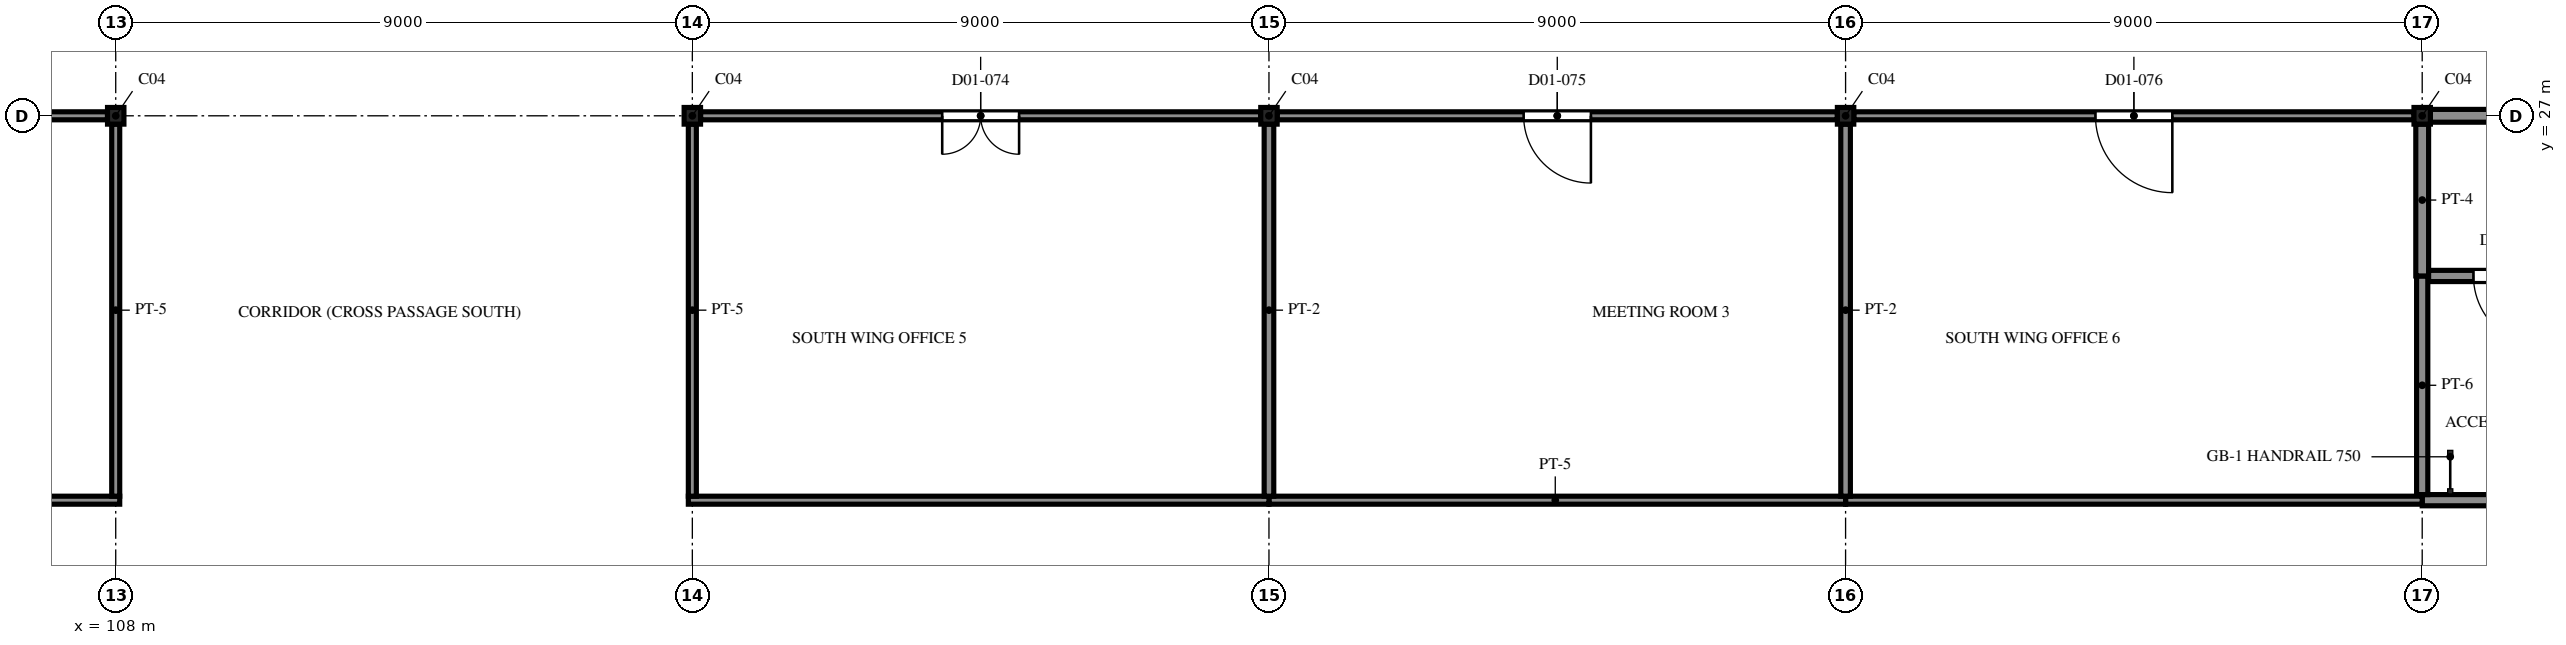
"""IFC4 building model, lengths in metres.
Left out: names, types, materials, properties, quantities, classifications, styles, units other than length and angle.
Written with IfcOpenShell. Run it as: python <this file> out.ifc"""

import sys

from ifc_helpers import new_model, si_unit, direction, frame, frame_2d, origin, origin_2d, place, context, subcontext, project, spatial, polyline, rectangle, i_section, outline, extrude, element, fill, save


model = new_model("IFC4")
c1 = context("Model", 3, precision=1e-05, world=origin(), true_north=direction((0.0, 1.0)))
c2 = subcontext(c1, "Body", "Model", "MODEL_VIEW")
j1 = project(units=[si_unit("LENGTHUNIT", "METRE"), si_unit("PLANEANGLEUNIT", "RADIAN")], contexts=[c1])
p1 = place(None, origin())
s1 = spatial("IfcSite", under=j1, at=p1, CompositionType="ELEMENT")
p2 = place(p1, origin())
s2 = spatial("IfcBuilding", under=s1, at=p2, CompositionType="ELEMENT")
p3 = place(p2, frame((0.0, 0.0, 7.5)))
s3 = spatial("IfcBuildingStorey", under=s2, at=p3, CompositionType="ELEMENT", Elevation=7.5)
for number, where, z_axis, x_axis in (
    (1, (108.0, 27.0, 0.0), (0.0, 0.0, 1.0), (1.0, 0.0, 0.0)),
    (2, (117.0, 27.0, 0.0), (0.0, 0.0, 1.0), (1.0, 0.0, 0.0)),
    (3, (126.0, 27.0, 0.0), (0.0, 0.0, 1.0), (1.0, 0.0, 0.0)),
    (4, (135.0, 27.0, 0.0), (0.0, 0.0, 1.0), (1.0, 0.0, 0.0)),
    (5, (144.0, 27.0, 0.0), (0.0, 0.0, 1.0), (1.0, 0.0, 0.0)),
):
    element("IfcColumn", number, at=place(p3, frame(where, z_axis=z_axis, x_axis=x_axis)), inside=s3, PredefinedType="COLUMN", context=c2, shape_type="SweptSolid", body=[
        extrude(i_section(OverallWidth=0.256, OverallDepth=0.26, WebThickness=0.01, FlangeThickness=0.017, FilletRadius=0.013, at=origin_2d()), origin(), (0.0, 0.0, 1.0), 4.2),
    ])
p4 = place(p3, frame((144.0, 21.0, 0.0), z_axis=(0.0, 0.0, 1.0), x_axis=(1.0, 0.0, 0.0)))
e6 = element("IfcWall", 6, at=p4, inside=s3, PredefinedType="PARTITIONING", context=c2, shape_type="SweptSolid", body=[
    extrude(rectangle(XDim=2.7, YDim=0.175, at=frame_2d((1.35, 0.0))), origin(), (0.0, 0.0, 1.0), 3.307),
])
for number, where, z_axis, x_axis in (
    (7, (135.0, 21.0, 0.0), (0.0, 0.0, 1.0), (1.0, 0.0, 0.0)),
    (8, (126.0, 21.0, 0.0), (0.0, 0.0, 1.0), (1.0, 0.0, 0.0)),
):
    element("IfcWall", number, at=place(p3, frame(where, z_axis=z_axis, x_axis=x_axis)), inside=s3, PredefinedType="PARTITIONING", context=c2, shape_type="SweptSolid", body=[
        extrude(rectangle(XDim=9.0, YDim=0.125, at=frame_2d((4.5, 0.0))), origin(), (0.0, 0.0, 1.0), 3.307),
    ])
for number, where, z_axis, x_axis in (
    (9, (99.0, 21.0, 0.0), (0.0, 0.0, 1.0), (1.0, 0.0, 0.0)),
    (10, (116.938, 21.0, 0.0), (0.0, 0.0, 1.0), (1.0, 0.0, 0.0)),
):
    element("IfcWall", number, at=place(p3, frame(where, z_axis=z_axis, x_axis=x_axis)), inside=s3, PredefinedType="PARTITIONING", context=c2, shape_type="SweptSolid", body=[
        extrude(rectangle(XDim=9.062, YDim=0.125, at=frame_2d((4.531, 0.0))), origin(), (0.0, 0.0, 1.0), 3.307),
    ])
p5 = place(p3, frame((143.872, 27.0, 0.0), z_axis=(0.0, 0.0, 1.0), x_axis=(-1.0, 0.0, 0.0)))
e11 = element("IfcWall", 11, at=p5, inside=s3, PredefinedType="PARTITIONING", context=c2, shape_type="SweptSolid", body=[
    extrude(rectangle(XDim=8.744, YDim=0.125, at=frame_2d((4.372, 0.0))), origin(), (0.0, 0.0, 1.0), 3.307),
])
p6 = place(p5, frame((3.772, 0.0, 0.0)))
e12 = element("IfcOpeningElement", 12, at=p6, cuts=e11, PredefinedType="OPENING", context=c2, shape_type="SweptSolid", body=[
    extrude(rectangle(XDim=1.2, YDim=2.1, at=frame_2d((0.6, 1.05))), frame((0.0, 0.073, 0.0), z_axis=(0.0, -1.0, 0.0), x_axis=(1.0, 0.0, 0.0)), (0.0, 0.0, 1.0), 0.145),
])
p7 = place(p3, frame((134.872, 27.0, 0.0), z_axis=(0.0, 0.0, 1.0), x_axis=(-1.0, 0.0, 0.0)))
e13 = element("IfcWall", 13, at=p7, inside=s3, PredefinedType="PARTITIONING", context=c2, shape_type="SweptSolid", body=[
    extrude(rectangle(XDim=8.744, YDim=0.125, at=frame_2d((4.372, 0.0))), origin(), (0.0, 0.0, 1.0), 3.307),
])
p8 = place(p7, frame((3.847, 0.0, 0.0)))
e14 = element("IfcOpeningElement", 14, at=p8, cuts=e13, PredefinedType="OPENING", context=c2, shape_type="SweptSolid", body=[
    extrude(rectangle(XDim=1.05, YDim=2.1, at=frame_2d((0.525, 1.05))), frame((0.0, 0.073, 0.0), z_axis=(0.0, -1.0, 0.0), x_axis=(1.0, 0.0, 0.0)), (0.0, 0.0, 1.0), 0.145),
])
p9 = place(p3, frame((107.872, 27.0, 0.0), z_axis=(0.0, 0.0, 1.0), x_axis=(-1.0, 0.0, 0.0)))
e15 = element("IfcWall", 15, at=p9, inside=s3, PredefinedType="PARTITIONING", context=c2, shape_type="SweptSolid", body=[
    extrude(rectangle(XDim=8.744, YDim=0.125, at=frame_2d((4.372, 0.0))), origin(), (0.0, 0.0, 1.0), 3.307),
])
p10 = place(p9, frame((3.772, 0.0, 0.0)))
e16 = element("IfcOpeningElement", 16, at=p10, cuts=e15, PredefinedType="OPENING", context=c2, shape_type="SweptSolid", body=[
    extrude(rectangle(XDim=1.2, YDim=2.1, at=frame_2d((0.6, 1.05))), frame((0.0, 0.073, 0.0), z_axis=(0.0, -1.0, 0.0), x_axis=(1.0, 0.0, 0.0)), (0.0, 0.0, 1.0), 0.145),
])
p11 = place(p3, frame((125.872, 27.0, 0.0), z_axis=(0.0, 0.0, 1.0), x_axis=(-1.0, 0.0, 0.0)))
e17 = element("IfcWall", 17, at=p11, inside=s3, PredefinedType="PARTITIONING", context=c2, shape_type="SweptSolid", body=[
    extrude(rectangle(XDim=8.744, YDim=0.125, at=frame_2d((4.372, 0.0))), origin(), (0.0, 0.0, 1.0), 3.307),
])
p12 = place(p11, frame((3.772, 0.0, 0.0)))
e18 = element("IfcOpeningElement", 18, at=p12, cuts=e17, PredefinedType="OPENING", context=c2, shape_type="SweptSolid", body=[
    extrude(rectangle(XDim=1.2, YDim=2.1, at=frame_2d((0.6, 1.05))), frame((0.0, 0.073, 0.0), z_axis=(0.0, -1.0, 0.0), x_axis=(1.0, 0.0, 0.0)), (0.0, 0.0, 1.0), 0.145),
])
p13 = place(p3, frame((152.872, 27.0, 0.0), z_axis=(0.0, 0.0, 1.0), x_axis=(-1.0, 0.0, 0.0)))
e19 = element("IfcWall", 19, at=p13, inside=s3, PredefinedType="PARTITIONING", context=c2, shape_type="SweptSolid", body=[
    extrude(rectangle(XDim=8.744, YDim=0.2, at=frame_2d((4.372, 0.0))), origin(), (0.0, 0.0, 1.0), 3.382),
])
p14 = place(p13, frame((3.772, 0.0, 0.0)))
e20 = element("IfcOpeningElement", 20, at=p14, cuts=e19, PredefinedType="OPENING", context=c2, shape_type="SweptSolid", body=[
    extrude(rectangle(XDim=1.2, YDim=2.1, at=frame_2d((0.6, 1.05))), frame((0.0, 0.11, 0.0), z_axis=(0.0, -1.0, 0.0), x_axis=(1.0, 0.0, 0.0)), (0.0, 0.0, 1.0), 0.22),
])
for number, where, z_axis, x_axis in (
    (21, (108.0, 21.062, 0.0), (0.0, 0.0, 1.0), (0.0, 1.0, 0.0)),
    (22, (117.0, 26.87, 0.0), (0.0, 0.0, 1.0), (0.0, -1.0, 0.0)),
):
    element("IfcWall", number, at=place(p3, frame(where, z_axis=z_axis, x_axis=x_axis)), inside=s3, PredefinedType="PARTITIONING", context=c2, shape_type="SweptSolid", body=[
        extrude(rectangle(XDim=5.807, YDim=0.125, at=frame_2d((2.904, 0.0))), origin(), (0.0, 0.0, 1.0), 3.307),
    ])
for number, where, z_axis, x_axis in (
    (23, (126.0, 26.87, 0.0), (0.0, 0.0, 1.0), (0.0, -1.0, 0.0)),
    (24, (135.0, 26.87, 0.0), (0.0, 0.0, 1.0), (0.0, -1.0, 0.0)),
):
    element("IfcWall", number, at=place(p3, frame(where, z_axis=z_axis, x_axis=x_axis)), inside=s3, PredefinedType="PARTITIONING", context=c2, shape_type="SweptSolid", body=[
        extrude(rectangle(XDim=5.807, YDim=0.15, at=frame_2d((2.904, 0.0))), origin(), (0.0, 0.0, 1.0), 3.307),
    ])
p15 = place(p3, frame((144.0, 24.5, 0.0), z_axis=(0.0, 0.0, 1.0), x_axis=(0.0, -1.0, 0.0)))
e25 = element("IfcWall", 25, at=p15, inside=s3, PredefinedType="PARTITIONING", context=c2, shape_type="SweptSolid", body=[
    extrude(rectangle(XDim=3.413, YDim=0.175, at=frame_2d((1.706, 0.0))), origin(), (0.0, 0.0, 1.0), 3.307),
])
p16 = place(p3, frame((144.0, 26.87, 0.0), z_axis=(0.0, 0.0, 1.0), x_axis=(0.0, -1.0, 0.0)))
e26 = element("IfcWall", 26, at=p16, inside=s3, PredefinedType="PARTITIONING", context=c2, shape_type="SweptSolid", body=[
    extrude(rectangle(XDim=2.37, YDim=0.2, at=frame_2d((1.185, 0.0))), origin(), (0.0, 0.0, 1.0), 3.382),
])
p17 = place(p3, frame((146.7, 24.5, 0.0), z_axis=(0.0, 0.0, 1.0), x_axis=(-1.0, 0.0, 0.0)))
e27 = element("IfcWall", 27, at=p17, inside=s3, PredefinedType="PARTITIONING", context=c2, shape_type="SweptSolid", body=[
    extrude(rectangle(XDim=2.6, YDim=0.175, at=frame_2d((1.3, 0.0))), origin(), (0.0, 0.0, 1.0), 3.307),
])
p18 = place(p17, frame((0.8, 0.0, 0.0)))
e28 = element("IfcOpeningElement", 28, at=p18, cuts=e27, PredefinedType="OPENING", context=c2, shape_type="SweptSolid", body=[
    extrude(rectangle(XDim=1.1, YDim=2.1, at=frame_2d((0.55, 1.05))), frame((0.0, 0.097, 0.0), z_axis=(0.0, -1.0, 0.0), x_axis=(1.0, 0.0, 0.0)), (0.0, 0.0, 1.0), 0.195),
])
p19 = place(p12, origin())
e29 = element("IfcDoor", 29, at=p19, inside=s3, OperationType="DOUBLE_DOOR_SINGLE_SWING", PredefinedType="DOOR", context=c2, shape_type="SweptSolid", body=[
    extrude(outline(polyline([(0.0, 0.0), (0.07, 0.0), (0.07, 2.03), (1.13, 2.03), (1.13, 0.0), (1.2, 0.0), (1.2, 2.1), (0.0, 2.1), (0.0, 0.0)])), frame((0.0, 0.025, 0.0), z_axis=(0.0, -1.0, 0.0), x_axis=(1.0, 0.0, 0.0)), (0.0, 0.0, 1.0), 0.05),
    extrude(outline(polyline([(0.074, 0.01), (0.597, 0.01), (0.597, 2.026), (0.074, 2.026), (0.074, 0.01)]), holes=[polyline([(0.178, 0.373), (0.492, 0.373), (0.492, 1.784), (0.178, 1.784), (0.178, 0.373)])]), frame((0.0, 0.017, 0.0), z_axis=(0.0, -1.0, 0.0), x_axis=(1.0, 0.0, 0.0)), (0.0, 0.0, 1.0), 0.035),
    extrude(rectangle(XDim=0.314, YDim=1.411, at=frame_2d((0.335, 1.079))), frame((0.0, 0.009, 0.0), z_axis=(0.0, -1.0, 0.0), x_axis=(1.0, 0.0, 0.0)), (0.0, 0.0, 1.0), 0.017),
    extrude(outline(polyline([(0.603, 0.01), (1.126, 0.01), (1.126, 2.026), (0.603, 2.026), (0.603, 0.01)]), holes=[polyline([(0.708, 0.373), (1.021, 0.373), (1.021, 1.784), (0.708, 1.784), (0.708, 0.373)])]), frame((0.0, 0.017, 0.0), z_axis=(0.0, -1.0, 0.0), x_axis=(1.0, 0.0, 0.0)), (0.0, 0.0, 1.0), 0.035),
    extrude(rectangle(XDim=0.314, YDim=1.411, at=frame_2d((0.865, 1.079))), frame((0.0, 0.009, 0.0), z_axis=(0.0, -1.0, 0.0), x_axis=(1.0, 0.0, 0.0)), (0.0, 0.0, 1.0), 0.017),
])
fill(e18, e29)
p20 = place(p8, origin())
e30 = element("IfcDoor", 30, at=p20, inside=s3, OperationType="SINGLE_SWING_LEFT", PredefinedType="DOOR", context=c2, shape_type="SweptSolid", body=[
    extrude(outline(polyline([(0.0, 0.0), (0.07, 0.0), (0.07, 2.03), (0.98, 2.03), (0.98, 0.0), (1.05, 0.0), (1.05, 2.1), (0.0, 2.1), (0.0, 0.0)])), frame((0.0, 0.025, 0.0), z_axis=(0.0, -1.0, 0.0), x_axis=(1.0, 0.0, 0.0)), (0.0, 0.0, 1.0), 0.05),
    extrude(outline(polyline([(0.074, 0.01), (0.976, 0.01), (0.976, 2.026), (0.074, 2.026), (0.074, 0.01)]), holes=[polyline([(0.194, 0.16), (0.856, 0.16), (0.856, 1.01), (0.194, 1.01), (0.194, 0.16)]), polyline([(0.375, 1.16), (0.675, 1.16), (0.675, 1.76), (0.375, 1.76), (0.375, 1.16)])]), frame((0.0, 0.017, 0.0), z_axis=(0.0, -1.0, 0.0), x_axis=(1.0, 0.0, 0.0)), (0.0, 0.0, 1.0), 0.035),
    extrude(rectangle(XDim=0.662, YDim=0.85, at=frame_2d((0.525, 0.585))), frame((0.0, 0.009, 0.0), z_axis=(0.0, -1.0, 0.0), x_axis=(1.0, 0.0, 0.0)), (0.0, 0.0, 1.0), 0.017),
    extrude(rectangle(XDim=0.3, YDim=0.6, at=frame_2d((0.525, 1.46))), frame((0.0, 0.006, 0.0), z_axis=(0.0, -1.0, 0.0), x_axis=(1.0, 0.0, 0.0)), (0.0, 0.0, 1.0), 0.012),
])
fill(e14, e30)
p21 = place(p6, origin())
e31 = element("IfcDoor", 31, at=p21, inside=s3, OperationType="DOUBLE_DOOR_SINGLE_SWING", PredefinedType="DOOR", context=c2, shape_type="SweptSolid", body=[
    extrude(outline(polyline([(0.0, 0.0), (0.07, 0.0), (0.07, 2.03), (1.13, 2.03), (1.13, 0.0), (1.2, 0.0), (1.2, 2.1), (0.0, 2.1), (0.0, 0.0)])), frame((0.0, 0.025, 0.0), z_axis=(0.0, -1.0, 0.0), x_axis=(1.0, 0.0, 0.0)), (0.0, 0.0, 1.0), 0.05),
    extrude(outline(polyline([(0.074, 0.01), (0.597, 0.01), (0.597, 2.026), (0.074, 2.026), (0.074, 0.01)]), holes=[polyline([(0.178, 0.373), (0.492, 0.373), (0.492, 1.784), (0.178, 1.784), (0.178, 0.373)])]), frame((0.0, 0.017, 0.0), z_axis=(0.0, -1.0, 0.0), x_axis=(1.0, 0.0, 0.0)), (0.0, 0.0, 1.0), 0.035),
    extrude(rectangle(XDim=0.314, YDim=1.411, at=frame_2d((0.335, 1.079))), frame((0.0, 0.009, 0.0), z_axis=(0.0, -1.0, 0.0), x_axis=(1.0, 0.0, 0.0)), (0.0, 0.0, 1.0), 0.017),
    extrude(outline(polyline([(0.603, 0.01), (1.126, 0.01), (1.126, 2.026), (0.603, 2.026), (0.603, 0.01)]), holes=[polyline([(0.708, 0.373), (1.021, 0.373), (1.021, 1.784), (0.708, 1.784), (0.708, 0.373)])]), frame((0.0, 0.017, 0.0), z_axis=(0.0, -1.0, 0.0), x_axis=(1.0, 0.0, 0.0)), (0.0, 0.0, 1.0), 0.035),
    extrude(rectangle(XDim=0.314, YDim=1.411, at=frame_2d((0.865, 1.079))), frame((0.0, 0.009, 0.0), z_axis=(0.0, -1.0, 0.0), x_axis=(1.0, 0.0, 0.0)), (0.0, 0.0, 1.0), 0.017),
])
fill(e12, e31)
p22 = place(p18, origin())
e32 = element("IfcDoor", 32, at=p22, inside=s3, OperationType="SINGLE_SWING_LEFT", PredefinedType="DOOR", context=c2, shape_type="SweptSolid", body=[
    extrude(outline(polyline([(0.0, 0.0), (0.07, 0.0), (0.07, 2.03), (1.03, 2.03), (1.03, 0.0), (1.1, 0.0), (1.1, 2.1), (0.0, 2.1), (0.0, 0.0)])), frame((0.0, 0.025, 0.0), z_axis=(0.0, -1.0, 0.0), x_axis=(1.0, 0.0, 0.0)), (0.0, 0.0, 1.0), 0.05),
    extrude(outline(polyline([(0.074, 0.01), (1.026, 0.01), (1.026, 2.026), (0.074, 2.026), (0.074, 0.01)]), holes=[polyline([(0.194, 0.16), (0.906, 0.16), (0.906, 1.01), (0.194, 1.01), (0.194, 0.16)]), polyline([(0.4, 1.16), (0.7, 1.16), (0.7, 1.76), (0.4, 1.76), (0.4, 1.16)])]), frame((0.0, 0.017, 0.0), z_axis=(0.0, -1.0, 0.0), x_axis=(1.0, 0.0, 0.0)), (0.0, 0.0, 1.0), 0.035),
    extrude(rectangle(XDim=0.712, YDim=0.85, at=frame_2d((0.55, 0.585))), frame((0.0, 0.009, 0.0), z_axis=(0.0, -1.0, 0.0), x_axis=(1.0, 0.0, 0.0)), (0.0, 0.0, 1.0), 0.017),
    extrude(rectangle(XDim=0.3, YDim=0.6, at=frame_2d((0.55, 1.46))), frame((0.0, 0.006, 0.0), z_axis=(0.0, -1.0, 0.0), x_axis=(1.0, 0.0, 0.0)), (0.0, 0.0, 1.0), 0.012),
])
fill(e28, e32)
save(model, sys.argv[1])
